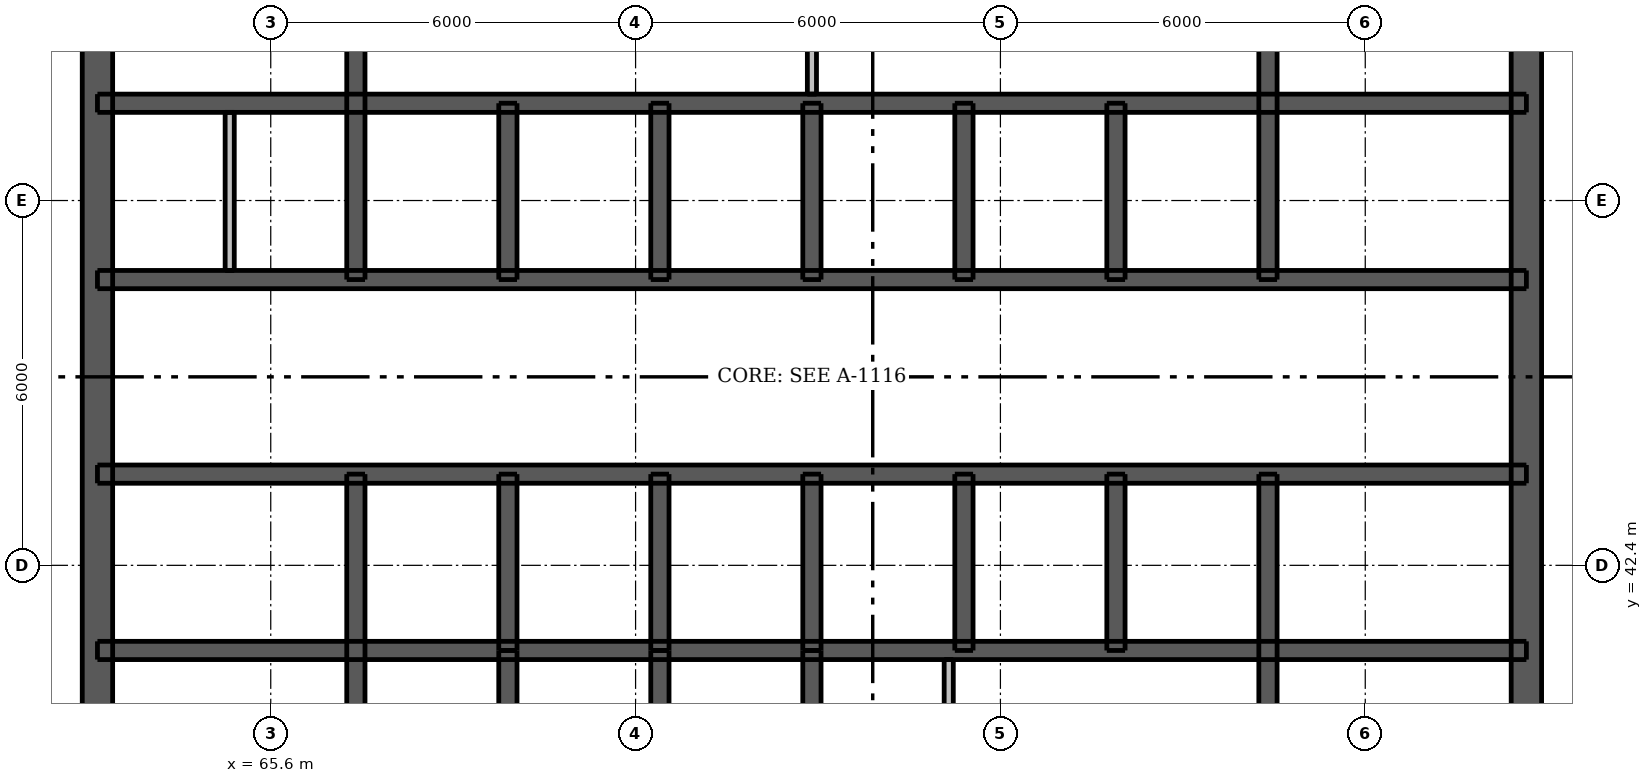
"""IFC4 building model, lengths in metres.
Left out: names, types, materials, properties, quantities, classifications, styles, units other than length and angle.
Written with IfcOpenShell. Run it as: python <this file> out.ifc"""

import sys

from ifc_helpers import new_model, si_unit, direction, frame, frame_2d, origin, place, context, subcontext, project, spatial, rectangle, extrude, element, fill, save


model = new_model("IFC4")
c1 = context("Model", 3, precision=1e-05, world=origin(), true_north=direction((0.0, 1.0)))
c2 = subcontext(c1, "Body", "Model", "MODEL_VIEW")
j1 = project(units=[si_unit("LENGTHUNIT", "METRE"), si_unit("PLANEANGLEUNIT", "RADIAN")], contexts=[c1])
p1 = place(None, origin())
s1 = spatial("IfcSite", under=j1, at=p1, CompositionType="ELEMENT")
p2 = place(p1, origin())
s2 = spatial("IfcBuilding", under=s1, at=p2, CompositionType="ELEMENT")
p3 = place(p2, frame((0.0, 0.0, 238.9)))
s3 = spatial("IfcBuildingStorey", under=s2, at=p3, CompositionType="ELEMENT", Elevation=238.9)
p4 = place(p3, frame((62.75, 33.5, 0.0), z_axis=(0.0, 0.0, 1.0), x_axis=(0.0, 1.0, 0.0)))
e1 = element("IfcWall", 1, at=p4, inside=s3, PredefinedType="SHEAR", context=c2, shape_type="SweptSolid", body=[
    extrude(rectangle(XDim=24.0, YDim=0.5, at=frame_2d((12.0, 0.0))), origin(), (0.0, 0.0, 1.0), 3.05),
])
p5 = place(p4, frame((11.2, 0.0, 0.0)))
e2 = element("IfcOpeningElement", 2, at=p5, cuts=e1, PredefinedType="OPENING", context=c2, shape_type="SweptSolid", body=[
    extrude(rectangle(XDim=1.6, YDim=2.1, at=frame_2d((0.8, 1.05))), frame((0.0, 0.26, 0.0), z_axis=(0.0, -1.0, 0.0), x_axis=(1.0, 0.0, 0.0)), (0.0, 0.0, 1.0), 0.52),
])
p6 = place(p3, frame((86.25, 33.5, 0.0), z_axis=(0.0, 0.0, 1.0), x_axis=(0.0, 1.0, 0.0)))
e3 = element("IfcWall", 3, at=p6, inside=s3, PredefinedType="SHEAR", context=c2, shape_type="SweptSolid", body=[
    extrude(rectangle(XDim=24.0, YDim=0.5, at=frame_2d((12.0, 0.0))), origin(), (0.0, 0.0, 1.0), 3.05),
])
p7 = place(p6, frame((11.2, 0.0, 0.0)))
e4 = element("IfcOpeningElement", 4, at=p7, cuts=e3, PredefinedType="OPENING", context=c2, shape_type="SweptSolid", body=[
    extrude(rectangle(XDim=1.6, YDim=2.1, at=frame_2d((0.8, 1.05))), frame((0.0, 0.26, 0.0), z_axis=(0.0, -1.0, 0.0), x_axis=(1.0, 0.0, 0.0)), (0.0, 0.0, 1.0), 0.52),
])
p8 = place(p3, frame((62.75, 41.0, 0.0), z_axis=(0.0, 0.0, 1.0), x_axis=(1.0, 0.0, 0.0)))
e5 = element("IfcWall", 5, at=p8, inside=s3, PredefinedType="SHEAR", context=c2, shape_type="SweptSolid", body=[
    extrude(rectangle(XDim=23.5, YDim=0.3, at=frame_2d((11.75, 0.0))), origin(), (0.0, 0.0, 1.0), 3.05),
])
p9 = place(p3, frame((62.75, 43.9, 0.0), z_axis=(0.0, 0.0, 1.0), x_axis=(1.0, 0.0, 0.0)))
e6 = element("IfcWall", 6, at=p9, inside=s3, PredefinedType="SHEAR", context=c2, shape_type="SweptSolid", body=[
    extrude(rectangle(XDim=23.5, YDim=0.3, at=frame_2d((11.75, 0.0))), origin(), (0.0, 0.0, 1.0), 3.05),
])
p10 = place(p9, frame((1.725, 0.0, 0.0)))
e7 = element("IfcOpeningElement", 7, at=p10, cuts=e6, PredefinedType="OPENING", context=c2, shape_type="SweptSolid", body=[
    extrude(rectangle(XDim=0.9, YDim=2.1, at=frame_2d((0.45, 1.05))), frame((0.0, 0.16, 0.0), z_axis=(0.0, -1.0, 0.0), x_axis=(1.0, 0.0, 0.0)), (0.0, 0.0, 1.0), 0.32),
])
p11 = place(p9, frame((20.875, 0.0, 0.0)))
e8 = element("IfcOpeningElement", 8, at=p11, cuts=e6, PredefinedType="OPENING", context=c2, shape_type="SweptSolid", body=[
    extrude(rectangle(XDim=0.9, YDim=2.1, at=frame_2d((0.45, 1.05))), frame((0.0, 0.16, 0.0), z_axis=(0.0, -1.0, 0.0), x_axis=(1.0, 0.0, 0.0)), (0.0, 0.0, 1.0), 0.32),
])
p12 = place(p9, frame((7.55, 0.0, 0.0)))
e9 = element("IfcOpeningElement", 9, at=p12, cuts=e6, PredefinedType="OPENING", context=c2, shape_type="SweptSolid", body=[
    extrude(rectangle(XDim=0.9, YDim=2.1, at=frame_2d((0.45, 1.05))), frame((0.0, 0.16, 0.0), z_axis=(0.0, -1.0, 0.0), x_axis=(1.0, 0.0, 0.0)), (0.0, 0.0, 1.0), 0.32),
])
p13 = place(p9, frame((10.05, 0.0, 0.0)))
e10 = element("IfcOpeningElement", 10, at=p13, cuts=e6, PredefinedType="OPENING", context=c2, shape_type="SweptSolid", body=[
    extrude(rectangle(XDim=0.9, YDim=2.1, at=frame_2d((0.45, 1.05))), frame((0.0, 0.16, 0.0), z_axis=(0.0, -1.0, 0.0), x_axis=(1.0, 0.0, 0.0)), (0.0, 0.0, 1.0), 0.32),
])
p14 = place(p9, frame((15.05, 0.0, 0.0)))
e11 = element("IfcOpeningElement", 11, at=p14, cuts=e6, PredefinedType="OPENING", context=c2, shape_type="SweptSolid", body=[
    extrude(rectangle(XDim=0.9, YDim=2.1, at=frame_2d((0.45, 1.05))), frame((0.0, 0.16, 0.0), z_axis=(0.0, -1.0, 0.0), x_axis=(1.0, 0.0, 0.0)), (0.0, 0.0, 1.0), 0.32),
])
p15 = place(p9, frame((17.55, 0.0, 0.0)))
e12 = element("IfcOpeningElement", 12, at=p15, cuts=e6, PredefinedType="OPENING", context=c2, shape_type="SweptSolid", body=[
    extrude(rectangle(XDim=0.9, YDim=2.1, at=frame_2d((0.45, 1.05))), frame((0.0, 0.16, 0.0), z_axis=(0.0, -1.0, 0.0), x_axis=(1.0, 0.0, 0.0)), (0.0, 0.0, 1.0), 0.32),
])
p16 = place(p3, frame((62.75, 47.1, 0.0), z_axis=(0.0, 0.0, 1.0), x_axis=(1.0, 0.0, 0.0)))
e13 = element("IfcWall", 13, at=p16, inside=s3, PredefinedType="SHEAR", context=c2, shape_type="SweptSolid", body=[
    extrude(rectangle(XDim=23.5, YDim=0.3, at=frame_2d((11.75, 0.0))), origin(), (0.0, 0.0, 1.0), 3.05),
])
p17 = place(p16, frame((0.762, 0.0, 0.0)))
e14 = element("IfcOpeningElement", 14, at=p17, cuts=e13, PredefinedType="OPENING", context=c2, shape_type="SweptSolid", body=[
    extrude(rectangle(XDim=0.9, YDim=2.1, at=frame_2d((0.45, 1.05))), frame((0.0, 0.16, 0.0), z_axis=(0.0, -1.0, 0.0), x_axis=(1.0, 0.0, 0.0)), (0.0, 0.0, 1.0), 0.32),
])
p18 = place(p16, frame((2.688, 0.0, 0.0)))
e15 = element("IfcOpeningElement", 15, at=p18, cuts=e13, PredefinedType="OPENING", context=c2, shape_type="SweptSolid", body=[
    extrude(rectangle(XDim=0.9, YDim=2.1, at=frame_2d((0.45, 1.05))), frame((0.0, 0.16, 0.0), z_axis=(0.0, -1.0, 0.0), x_axis=(1.0, 0.0, 0.0)), (0.0, 0.0, 1.0), 0.32),
])
p19 = place(p16, frame((20.875, 0.0, 0.0)))
e16 = element("IfcOpeningElement", 16, at=p19, cuts=e13, PredefinedType="OPENING", context=c2, shape_type="SweptSolid", body=[
    extrude(rectangle(XDim=0.9, YDim=2.1, at=frame_2d((0.45, 1.05))), frame((0.0, 0.16, 0.0), z_axis=(0.0, -1.0, 0.0), x_axis=(1.0, 0.0, 0.0)), (0.0, 0.0, 1.0), 0.32),
])
p20 = place(p16, frame((4.95, 0.0, 0.0)))
e17 = element("IfcOpeningElement", 17, at=p20, cuts=e13, PredefinedType="OPENING", context=c2, shape_type="SweptSolid", body=[
    extrude(rectangle(XDim=1.1, YDim=2.1, at=frame_2d((0.55, 1.05))), frame((0.0, 0.16, 0.0), z_axis=(0.0, -1.0, 0.0), x_axis=(1.0, 0.0, 0.0)), (0.0, 0.0, 1.0), 0.32),
])
p21 = place(p16, frame((7.45, 0.0, 0.0)))
e18 = element("IfcOpeningElement", 18, at=p21, cuts=e13, PredefinedType="OPENING", context=c2, shape_type="SweptSolid", body=[
    extrude(rectangle(XDim=1.1, YDim=2.1, at=frame_2d((0.55, 1.05))), frame((0.0, 0.16, 0.0), z_axis=(0.0, -1.0, 0.0), x_axis=(1.0, 0.0, 0.0)), (0.0, 0.0, 1.0), 0.32),
])
p22 = place(p16, frame((9.95, 0.0, 0.0)))
e19 = element("IfcOpeningElement", 19, at=p22, cuts=e13, PredefinedType="OPENING", context=c2, shape_type="SweptSolid", body=[
    extrude(rectangle(XDim=1.1, YDim=2.1, at=frame_2d((0.55, 1.05))), frame((0.0, 0.16, 0.0), z_axis=(0.0, -1.0, 0.0), x_axis=(1.0, 0.0, 0.0)), (0.0, 0.0, 1.0), 0.32),
])
p23 = place(p16, frame((12.45, 0.0, 0.0)))
e20 = element("IfcOpeningElement", 20, at=p23, cuts=e13, PredefinedType="OPENING", context=c2, shape_type="SweptSolid", body=[
    extrude(rectangle(XDim=1.1, YDim=2.1, at=frame_2d((0.55, 1.05))), frame((0.0, 0.16, 0.0), z_axis=(0.0, -1.0, 0.0), x_axis=(1.0, 0.0, 0.0)), (0.0, 0.0, 1.0), 0.32),
])
p24 = place(p16, frame((14.95, 0.0, 0.0)))
e21 = element("IfcOpeningElement", 21, at=p24, cuts=e13, PredefinedType="OPENING", context=c2, shape_type="SweptSolid", body=[
    extrude(rectangle(XDim=1.1, YDim=2.1, at=frame_2d((0.55, 1.05))), frame((0.0, 0.16, 0.0), z_axis=(0.0, -1.0, 0.0), x_axis=(1.0, 0.0, 0.0)), (0.0, 0.0, 1.0), 0.32),
])
p25 = place(p16, frame((17.45, 0.0, 0.0)))
e22 = element("IfcOpeningElement", 22, at=p25, cuts=e13, PredefinedType="OPENING", context=c2, shape_type="SweptSolid", body=[
    extrude(rectangle(XDim=1.1, YDim=2.1, at=frame_2d((0.55, 1.05))), frame((0.0, 0.16, 0.0), z_axis=(0.0, -1.0, 0.0), x_axis=(1.0, 0.0, 0.0)), (0.0, 0.0, 1.0), 0.32),
])
p26 = place(p3, frame((62.75, 50.0, 0.0), z_axis=(0.0, 0.0, 1.0), x_axis=(1.0, 0.0, 0.0)))
e23 = element("IfcWall", 23, at=p26, inside=s3, PredefinedType="SHEAR", context=c2, shape_type="SweptSolid", body=[
    extrude(rectangle(XDim=23.5, YDim=0.3, at=frame_2d((11.75, 0.0))), origin(), (0.0, 0.0, 1.0), 3.05),
])
p27 = place(p3, frame((67.0, 33.75, 0.0), z_axis=(0.0, 0.0, 1.0), x_axis=(0.0, 1.0, 0.0)))
e24 = element("IfcWall", 24, at=p27, inside=s3, PredefinedType="SHEAR", context=c2, shape_type="SweptSolid", body=[
    extrude(rectangle(XDim=10.15, YDim=0.3, at=frame_2d((5.075, 0.0))), origin(), (0.0, 0.0, 1.0), 3.05),
])
p28 = place(p27, frame((0.45, 0.0, 0.0)))
e25 = element("IfcOpeningElement", 25, at=p28, cuts=e24, PredefinedType="OPENING", context=c2, shape_type="SweptSolid", body=[
    extrude(rectangle(XDim=1.1, YDim=2.1, at=frame_2d((0.55, 1.05))), frame((0.0, 0.16, 0.0), z_axis=(0.0, -1.0, 0.0), x_axis=(1.0, 0.0, 0.0)), (0.0, 0.0, 1.0), 0.32),
])
for number, where, z_axis, x_axis in (
    (26, (67.0, 47.1, 0.0), (0.0, 0.0, 1.0), (0.0, 1.0, 0.0)),
    (27, (82.0, 33.75, 0.0), (0.0, 0.0, 1.0), (0.0, 1.0, 0.0)),
    (28, (82.0, 47.1, 0.0), (0.0, 0.0, 1.0), (0.0, 1.0, 0.0)),
):
    element("IfcWall", number, at=place(p3, frame(where, z_axis=z_axis, x_axis=x_axis)), inside=s3, PredefinedType="SHEAR", context=c2, shape_type="SweptSolid", body=[
        extrude(rectangle(XDim=10.15, YDim=0.3, at=frame_2d((5.075, 0.0))), origin(), (0.0, 0.0, 1.0), 3.05),
    ])
for number, where, z_axis, x_axis in (
    (29, (69.5, 41.0, 0.0), (0.0, 0.0, 1.0), (0.0, 1.0, 0.0)),
    (30, (69.5, 47.1, 0.0), (0.0, 0.0, 1.0), (0.0, 1.0, 0.0)),
    (31, (72.0, 41.0, 0.0), (0.0, 0.0, 1.0), (0.0, 1.0, 0.0)),
    (32, (72.0, 47.1, 0.0), (0.0, 0.0, 1.0), (0.0, 1.0, 0.0)),
    (33, (74.5, 41.0, 0.0), (0.0, 0.0, 1.0), (0.0, 1.0, 0.0)),
    (34, (74.5, 47.1, 0.0), (0.0, 0.0, 1.0), (0.0, 1.0, 0.0)),
    (35, (77.0, 41.0, 0.0), (0.0, 0.0, 1.0), (0.0, 1.0, 0.0)),
    (36, (77.0, 47.1, 0.0), (0.0, 0.0, 1.0), (0.0, 1.0, 0.0)),
    (37, (79.5, 41.0, 0.0), (0.0, 0.0, 1.0), (0.0, 1.0, 0.0)),
    (38, (79.5, 47.1, 0.0), (0.0, 0.0, 1.0), (0.0, 1.0, 0.0)),
    (39, (69.5, 38.1, 0.0), (0.0, 0.0, 1.0), (0.0, 1.0, 0.0)),
    (40, (72.0, 38.1, 0.0), (0.0, 0.0, 1.0), (0.0, 1.0, 0.0)),
    (41, (74.5, 38.1, 0.0), (0.0, 0.0, 1.0), (0.0, 1.0, 0.0)),
):
    element("IfcWall", number, at=place(p3, frame(where, z_axis=z_axis, x_axis=x_axis)), inside=s3, PredefinedType="SHEAR", context=c2, shape_type="SweptSolid", body=[
        extrude(rectangle(XDim=2.9, YDim=0.3, at=frame_2d((1.45, 0.0))), origin(), (0.0, 0.0, 1.0), 3.05),
    ])
p29 = place(p3, frame((76.75, 34.0, 0.0), z_axis=(0.0, 0.0, 1.0), x_axis=(0.0, 1.0, 0.0)))
e42 = element("IfcWall", 42, at=p29, inside=s3, PredefinedType="PLUMBINGWALL", context=c2, shape_type="SweptSolid", body=[
    extrude(rectangle(XDim=6.85, YDim=0.15, at=frame_2d((3.425, 0.0))), origin(), (0.0, 0.0, 1.0), 3.05),
])
p30 = place(p3, frame((64.925, 47.25, 0.0), z_axis=(0.0, 0.0, 1.0), x_axis=(0.0, 1.0, 0.0)))
e43 = element("IfcWall", 43, at=p30, inside=s3, PredefinedType="PLUMBINGWALL", context=c2, shape_type="SweptSolid", body=[
    extrude(rectangle(XDim=2.6, YDim=0.15, at=frame_2d((1.3, 0.0))), origin(), (0.0, 0.0, 1.0), 3.05),
])
p31 = place(p3, frame((74.5, 50.15, 0.0), z_axis=(0.0, 0.0, 1.0), x_axis=(0.0, 1.0, 0.0)))
e44 = element("IfcWall", 44, at=p31, inside=s3, PredefinedType="PLUMBINGWALL", context=c2, shape_type="SweptSolid", body=[
    extrude(rectangle(XDim=6.85, YDim=0.15, at=frame_2d((3.425, 0.0))), origin(), (0.0, 0.0, 1.0), 3.05),
])
p32 = place(p5, origin())
e45 = element("IfcDoor", 45, at=p32, inside=s3, OperationType="DOUBLE_DOOR_SINGLE_SWING", PredefinedType="DOOR", context=c2, shape_type="SweptSolid", body=[
    extrude(rectangle(XDim=1.6, YDim=2.1, at=frame_2d((0.8, 1.05))), frame((0.0, -0.188, 0.0), z_axis=(0.0, -1.0, 0.0), x_axis=(1.0, 0.0, 0.0)), (0.0, 0.0, 1.0), 0.05),
])
fill(e2, e45)
p33 = place(p7, origin())
e46 = element("IfcDoor", 46, at=p33, inside=s3, OperationType="DOUBLE_DOOR_SINGLE_SWING", PredefinedType="DOOR", context=c2, shape_type="SweptSolid", body=[
    extrude(rectangle(XDim=1.6, YDim=2.1, at=frame_2d((0.8, 1.05))), frame((0.0, 0.237, 0.0), z_axis=(0.0, -1.0, 0.0), x_axis=(1.0, 0.0, 0.0)), (0.0, 0.0, 1.0), 0.05),
])
fill(e4, e46)
p34 = place(p10, origin())
e47 = element("IfcDoor", 47, at=p34, inside=s3, OperationType="SINGLE_SWING_LEFT", PredefinedType="DOOR", context=c2, shape_type="SweptSolid", body=[
    extrude(rectangle(XDim=0.9, YDim=2.1, at=frame_2d((0.45, 1.05))), frame((0.0, -0.087, 0.0), z_axis=(0.0, -1.0, 0.0), x_axis=(1.0, 0.0, 0.0)), (0.0, 0.0, 1.0), 0.05),
])
fill(e7, e47)
p35 = place(p11, origin())
e48 = element("IfcDoor", 48, at=p35, inside=s3, OperationType="SINGLE_SWING_LEFT", PredefinedType="DOOR", context=c2, shape_type="SweptSolid", body=[
    extrude(rectangle(XDim=0.9, YDim=2.1, at=frame_2d((0.45, 1.05))), frame((0.0, -0.087, 0.0), z_axis=(0.0, -1.0, 0.0), x_axis=(1.0, 0.0, 0.0)), (0.0, 0.0, 1.0), 0.05),
])
fill(e8, e48)
p36 = place(p17, origin())
e49 = element("IfcDoor", 49, at=p36, inside=s3, OperationType="SINGLE_SWING_LEFT", PredefinedType="DOOR", context=c2, shape_type="SweptSolid", body=[
    extrude(rectangle(XDim=0.9, YDim=2.1, at=frame_2d((0.45, 1.05))), frame((0.0, 0.138, 0.0), z_axis=(0.0, -1.0, 0.0), x_axis=(1.0, 0.0, 0.0)), (0.0, 0.0, 1.0), 0.05),
])
fill(e14, e49)
p37 = place(p18, origin())
e50 = element("IfcDoor", 50, at=p37, inside=s3, OperationType="SINGLE_SWING_RIGHT", PredefinedType="DOOR", context=c2, shape_type="SweptSolid", body=[
    extrude(rectangle(XDim=0.9, YDim=2.1, at=frame_2d((0.45, 1.05))), frame((0.0, 0.138, 0.0), z_axis=(0.0, -1.0, 0.0), x_axis=(1.0, 0.0, 0.0)), (0.0, 0.0, 1.0), 0.05),
])
fill(e15, e50)
p38 = place(p19, origin())
e51 = element("IfcDoor", 51, at=p38, inside=s3, OperationType="SINGLE_SWING_LEFT", PredefinedType="DOOR", context=c2, shape_type="SweptSolid", body=[
    extrude(rectangle(XDim=0.9, YDim=2.1, at=frame_2d((0.45, 1.05))), frame((0.0, 0.138, 0.0), z_axis=(0.0, -1.0, 0.0), x_axis=(1.0, 0.0, 0.0)), (0.0, 0.0, 1.0), 0.05),
])
fill(e16, e51)
p39 = place(p12, origin())
e52 = element("IfcDoor", 52, at=p39, inside=s3, OperationType="SINGLE_SWING_LEFT", PredefinedType="DOOR", context=c2, shape_type="SweptSolid", body=[
    extrude(rectangle(XDim=0.9, YDim=2.1, at=frame_2d((0.45, 1.05))), frame((0.0, -0.087, 0.0), z_axis=(0.0, -1.0, 0.0), x_axis=(1.0, 0.0, 0.0)), (0.0, 0.0, 1.0), 0.05),
])
fill(e9, e52)
p40 = place(p13, origin())
e53 = element("IfcDoor", 53, at=p40, inside=s3, OperationType="SINGLE_SWING_RIGHT", PredefinedType="DOOR", context=c2, shape_type="SweptSolid", body=[
    extrude(rectangle(XDim=0.9, YDim=2.1, at=frame_2d((0.45, 1.05))), frame((0.0, -0.087, 0.0), z_axis=(0.0, -1.0, 0.0), x_axis=(1.0, 0.0, 0.0)), (0.0, 0.0, 1.0), 0.05),
])
fill(e10, e53)
p41 = place(p14, origin())
e54 = element("IfcDoor", 54, at=p41, inside=s3, OperationType="SINGLE_SWING_RIGHT", PredefinedType="DOOR", context=c2, shape_type="SweptSolid", body=[
    extrude(rectangle(XDim=0.9, YDim=2.1, at=frame_2d((0.45, 1.05))), frame((0.0, -0.087, 0.0), z_axis=(0.0, -1.0, 0.0), x_axis=(1.0, 0.0, 0.0)), (0.0, 0.0, 1.0), 0.05),
])
fill(e11, e54)
p42 = place(p15, origin())
e55 = element("IfcDoor", 55, at=p42, inside=s3, OperationType="SINGLE_SWING_LEFT", PredefinedType="DOOR", context=c2, shape_type="SweptSolid", body=[
    extrude(rectangle(XDim=0.9, YDim=2.1, at=frame_2d((0.45, 1.05))), frame((0.0, -0.087, 0.0), z_axis=(0.0, -1.0, 0.0), x_axis=(1.0, 0.0, 0.0)), (0.0, 0.0, 1.0), 0.05),
])
fill(e12, e55)
p43 = place(p20, origin())
e56 = element("IfcDoor", 56, at=p43, inside=s3, OperationType="DOUBLE_DOOR_SLIDING", PredefinedType="DOOR", context=c2, shape_type="SweptSolid", body=[
    extrude(rectangle(XDim=1.1, YDim=2.1, at=frame_2d((0.55, 1.05))), frame((0.0, 0.025, 0.0), z_axis=(0.0, -1.0, 0.0), x_axis=(1.0, 0.0, 0.0)), (0.0, 0.0, 1.0), 0.05),
])
fill(e17, e56)
p44 = place(p21, origin())
e57 = element("IfcDoor", 57, at=p44, inside=s3, OperationType="DOUBLE_DOOR_SLIDING", PredefinedType="DOOR", context=c2, shape_type="SweptSolid", body=[
    extrude(rectangle(XDim=1.1, YDim=2.1, at=frame_2d((0.55, 1.05))), frame((0.0, 0.025, 0.0), z_axis=(0.0, -1.0, 0.0), x_axis=(1.0, 0.0, 0.0)), (0.0, 0.0, 1.0), 0.05),
])
fill(e18, e57)
p45 = place(p22, origin())
e58 = element("IfcDoor", 58, at=p45, inside=s3, OperationType="DOUBLE_DOOR_SLIDING", PredefinedType="DOOR", context=c2, shape_type="SweptSolid", body=[
    extrude(rectangle(XDim=1.1, YDim=2.1, at=frame_2d((0.55, 1.05))), frame((0.0, 0.025, 0.0), z_axis=(0.0, -1.0, 0.0), x_axis=(1.0, 0.0, 0.0)), (0.0, 0.0, 1.0), 0.05),
])
fill(e19, e58)
p46 = place(p23, origin())
e59 = element("IfcDoor", 59, at=p46, inside=s3, OperationType="DOUBLE_DOOR_SLIDING", PredefinedType="DOOR", context=c2, shape_type="SweptSolid", body=[
    extrude(rectangle(XDim=1.1, YDim=2.1, at=frame_2d((0.55, 1.05))), frame((0.0, 0.025, 0.0), z_axis=(0.0, -1.0, 0.0), x_axis=(1.0, 0.0, 0.0)), (0.0, 0.0, 1.0), 0.05),
])
fill(e20, e59)
p47 = place(p24, origin())
e60 = element("IfcDoor", 60, at=p47, inside=s3, OperationType="DOUBLE_DOOR_SLIDING", PredefinedType="DOOR", context=c2, shape_type="SweptSolid", body=[
    extrude(rectangle(XDim=1.1, YDim=2.1, at=frame_2d((0.55, 1.05))), frame((0.0, 0.025, 0.0), z_axis=(0.0, -1.0, 0.0), x_axis=(1.0, 0.0, 0.0)), (0.0, 0.0, 1.0), 0.05),
])
fill(e21, e60)
p48 = place(p25, origin())
e61 = element("IfcDoor", 61, at=p48, inside=s3, OperationType="DOUBLE_DOOR_SLIDING", PredefinedType="DOOR", context=c2, shape_type="SweptSolid", body=[
    extrude(rectangle(XDim=1.1, YDim=2.1, at=frame_2d((0.55, 1.05))), frame((0.0, 0.025, 0.0), z_axis=(0.0, -1.0, 0.0), x_axis=(1.0, 0.0, 0.0)), (0.0, 0.0, 1.0), 0.05),
])
fill(e22, e61)
save(model, sys.argv[1])
